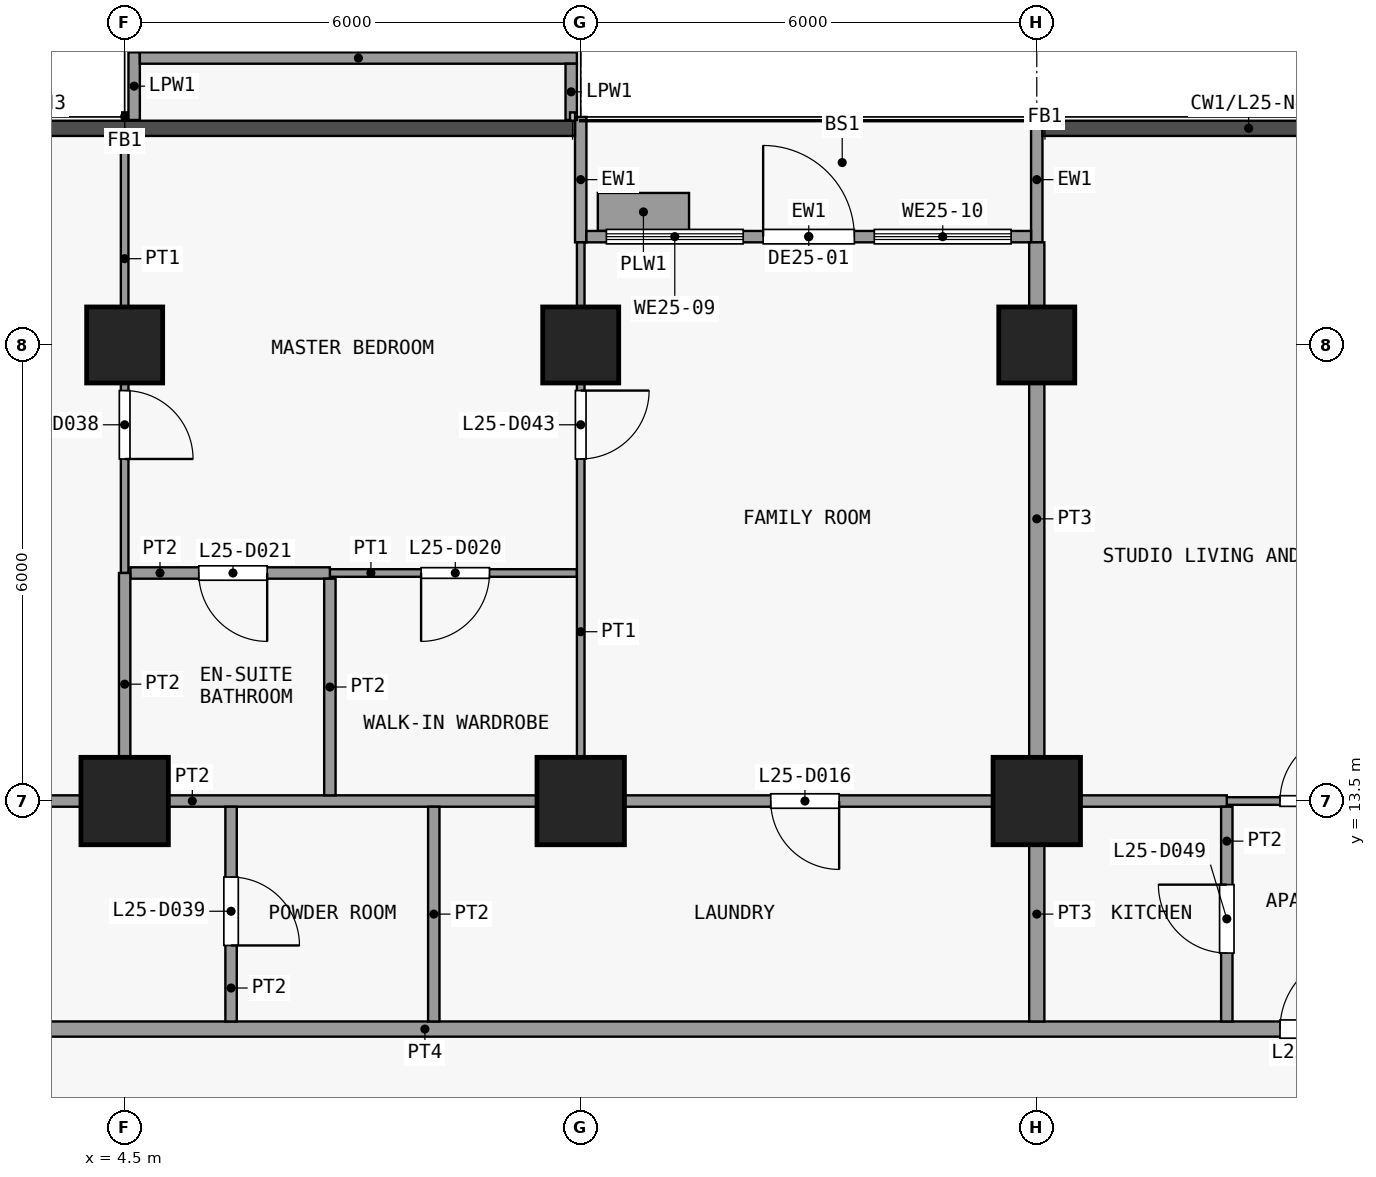
"""IFC4 building model, lengths in metres.
Left out: names, types, materials, properties, quantities, classifications, styles, units other than length and angle.
Written with IfcOpenShell. Run it as: python <this file> out.ifc"""

import sys

from ifc_helpers import new_model, si_unit, direction, frame, frame_2d, origin, origin_2d, place, context, subcontext, project, spatial, rectangle, extrude, element, fill, save


model = new_model("IFC4")
c1 = context("Model", 3, precision=1e-05, world=origin(), true_north=direction((0.0, 1.0)))
c2 = subcontext(c1, "Body", "Model", "MODEL_VIEW")
j1 = project(units=[si_unit("LENGTHUNIT", "METRE"), si_unit("PLANEANGLEUNIT", "RADIAN")], contexts=[c1])
p1 = place(None, origin())
s1 = spatial("IfcSite", under=j1, at=p1, CompositionType="ELEMENT")
p2 = place(p1, origin())
s2 = spatial("IfcBuilding", under=s1, at=p2, CompositionType="ELEMENT")
p3 = place(p2, frame((0.0, 0.0, 102.7)))
s3 = spatial("IfcBuildingStorey", under=s2, at=p3, CompositionType="ELEMENT", Elevation=102.7)
p4 = place(p3, frame((4.5, 13.5, 0.0), z_axis=(0.0, 0.0, 1.0), x_axis=(1.0, 0.0, 0.0)))
e1 = element("IfcColumn", 1, at=p4, inside=s3, PredefinedType="COLUMN", context=c2, shape_type="SweptSolid", body=[
    extrude(rectangle(XDim=1.15, YDim=1.15, at=origin_2d()), origin(), (0.0, 0.0, 1.0), 3.6),
])
p5 = place(p3, frame((4.5, 19.5, 0.0), z_axis=(0.0, 0.0, 1.0), x_axis=(1.0, 0.0, 0.0)))
e2 = element("IfcColumn", 2, at=p5, inside=s3, PredefinedType="COLUMN", context=c2, shape_type="SweptSolid", body=[
    extrude(rectangle(XDim=1.0, YDim=1.0, at=origin_2d()), origin(), (0.0, 0.0, 1.0), 3.6),
])
p6 = place(p3, frame((10.5, 13.5, 0.0), z_axis=(0.0, 0.0, 1.0), x_axis=(1.0, 0.0, 0.0)))
e3 = element("IfcColumn", 3, at=p6, inside=s3, PredefinedType="COLUMN", context=c2, shape_type="SweptSolid", body=[
    extrude(rectangle(XDim=1.15, YDim=1.15, at=origin_2d()), origin(), (0.0, 0.0, 1.0), 3.6),
])
p7 = place(p3, frame((10.5, 19.5, 0.0), z_axis=(0.0, 0.0, 1.0), x_axis=(1.0, 0.0, 0.0)))
e4 = element("IfcColumn", 4, at=p7, inside=s3, PredefinedType="COLUMN", context=c2, shape_type="SweptSolid", body=[
    extrude(rectangle(XDim=1.0, YDim=1.0, at=origin_2d()), origin(), (0.0, 0.0, 1.0), 3.6),
])
p8 = place(p3, frame((16.5, 13.5, 0.0), z_axis=(0.0, 0.0, 1.0), x_axis=(1.0, 0.0, 0.0)))
e5 = element("IfcColumn", 5, at=p8, inside=s3, PredefinedType="COLUMN", context=c2, shape_type="SweptSolid", body=[
    extrude(rectangle(XDim=1.15, YDim=1.15, at=origin_2d()), origin(), (0.0, 0.0, 1.0), 3.6),
])
p9 = place(p3, frame((16.5, 19.5, 0.0), z_axis=(0.0, 0.0, 1.0), x_axis=(1.0, 0.0, 0.0)))
e6 = element("IfcColumn", 6, at=p9, inside=s3, PredefinedType="COLUMN", context=c2, shape_type="SweptSolid", body=[
    extrude(rectangle(XDim=1.0, YDim=1.0, at=origin_2d()), origin(), (0.0, 0.0, 1.0), 3.6),
])
for number, where, z_axis, x_axis in (
    (7, (10.5, 20.85, 0.0), (0.0, 0.0, 1.0), (0.0, 1.0, 0.0)),
    (8, (16.5, 20.85, 0.0), (0.0, 0.0, 1.0), (0.0, 1.0, 0.0)),
):
    element("IfcWall", number, at=place(p3, frame(where, z_axis=z_axis, x_axis=x_axis)), inside=s3, PredefinedType="SOLIDWALL", context=c2, shape_type="SweptSolid", body=[
        extrude(rectangle(XDim=1.65, YDim=0.15, at=frame_2d((0.825, 0.0))), origin(), (0.0, 0.0, 1.0), 3.3),
    ])
p10 = place(p3, frame((10.575, 20.925, 0.0), z_axis=(0.0, 0.0, 1.0), x_axis=(1.0, 0.0, 0.0)))
e9 = element("IfcWall", 9, at=p10, inside=s3, PredefinedType="SOLIDWALL", context=c2, shape_type="SweptSolid", body=[
    extrude(rectangle(XDim=5.85, YDim=0.15, at=frame_2d((2.925, 0.0))), origin(), (0.0, 0.0, 1.0), 3.3),
])
p11 = place(p10, frame((2.325, 0.0, 0.0)))
e10 = element("IfcOpeningElement", 10, at=p11, cuts=e9, PredefinedType="OPENING", context=c2, shape_type="SweptSolid", body=[
    extrude(rectangle(XDim=1.2, YDim=2.4, at=frame_2d((0.6, 1.2))), frame((0.0, 0.085, 0.0), z_axis=(0.0, -1.0, 0.0), x_axis=(1.0, 0.0, 0.0)), (0.0, 0.0, 1.0), 0.17),
])
p12 = place(p10, frame((0.262, 0.0, 0.9)))
e11 = element("IfcOpeningElement", 11, at=p12, cuts=e9, PredefinedType="OPENING", context=c2, shape_type="SweptSolid", body=[
    extrude(rectangle(XDim=1.8, YDim=2.1, at=frame_2d((0.9, 1.05))), frame((0.0, 0.085, 0.0), z_axis=(0.0, -1.0, 0.0), x_axis=(1.0, 0.0, 0.0)), (0.0, 0.0, 1.0), 0.17),
])
p13 = place(p10, frame((3.788, 0.0, 0.9)))
e12 = element("IfcOpeningElement", 12, at=p13, cuts=e9, PredefinedType="OPENING", context=c2, shape_type="SweptSolid", body=[
    extrude(rectangle(XDim=1.8, YDim=2.1, at=frame_2d((0.9, 1.05))), frame((0.0, 0.085, 0.0), z_axis=(0.0, -1.0, 0.0), x_axis=(1.0, 0.0, 0.0)), (0.0, 0.0, 1.0), 0.17),
])
p14 = place(p3, frame((10.725, 21.25, 0.0), z_axis=(0.0, 0.0, 1.0), x_axis=(1.0, 0.0, 0.0)))
e13 = element("IfcWall", 13, at=p14, inside=s3, PredefinedType="USERDEFINED", context=c2, shape_type="SweptSolid", body=[
    extrude(rectangle(XDim=1.2, YDim=0.5, at=frame_2d((0.6, 0.0))), origin(), (0.0, 0.0, 1.0), 0.9),
])
p15 = place(p3, frame((4.625, 22.46, 0.0), z_axis=(0.0, 0.0, 1.0), x_axis=(0.0, 1.0, 0.0)))
e14 = element("IfcWall", 14, at=p15, inside=s3, PredefinedType="PARAPET", context=c2, shape_type="SweptSolid", body=[
    extrude(rectangle(XDim=0.89, YDim=0.15, at=frame_2d((0.445, 0.0))), origin(), (0.0, 0.0, 1.0), 1.15),
])
p16 = place(p3, frame((4.7, 23.275, 0.0), z_axis=(0.0, 0.0, 1.0), x_axis=(1.0, 0.0, 0.0)))
e15 = element("IfcWall", 15, at=p16, inside=s3, PredefinedType="PARAPET", context=c2, shape_type="SweptSolid", body=[
    extrude(rectangle(XDim=5.75, YDim=0.15, at=frame_2d((2.875, 0.0))), origin(), (0.0, 0.0, 1.0), 1.15),
])
p17 = place(p3, frame((10.375, 23.2, 0.0), z_axis=(0.0, 0.0, 1.0), x_axis=(0.0, -1.0, 0.0)))
e16 = element("IfcWall", 16, at=p17, inside=s3, PredefinedType="PARAPET", context=c2, shape_type="SweptSolid", body=[
    extrude(rectangle(XDim=0.74, YDim=0.15, at=frame_2d((0.37, 0.0))), origin(), (0.0, 0.0, 1.0), 1.15),
])
p18 = place(p3, frame((-25.35, 10.5, 0.0), z_axis=(0.0, 0.0, 1.0), x_axis=(1.0, 0.0, 0.0)))
e17 = element("IfcWall", 17, at=p18, inside=s3, PredefinedType="PARTITIONING", context=c2, shape_type="SweptSolid", body=[
    extrude(rectangle(XDim=50.7, YDim=0.2, at=frame_2d((25.35, 0.0))), origin(), (0.0, 0.0, 1.0), 3.3),
])
p19 = place(p18, frame((7.05, 0.0, 0.0)))
e18 = element("IfcOpeningElement", 18, at=p19, cuts=e17, PredefinedType="OPENING", context=c2, shape_type="SweptSolid", body=[
    extrude(rectangle(XDim=1.0, YDim=2.1, at=frame_2d((0.5, 1.05))), frame((0.0, 0.11, 0.0), z_axis=(0.0, -1.0, 0.0), x_axis=(1.0, 0.0, 0.0)), (0.0, 0.0, 1.0), 0.22),
])
p20 = place(p18, frame((21.55, 0.0, 0.0)))
e19 = element("IfcOpeningElement", 19, at=p20, cuts=e17, PredefinedType="OPENING", context=c2, shape_type="SweptSolid", body=[
    extrude(rectangle(XDim=1.0, YDim=2.1, at=frame_2d((0.5, 1.05))), frame((0.0, 0.11, 0.0), z_axis=(0.0, -1.0, 0.0), x_axis=(1.0, 0.0, 0.0)), (0.0, 0.0, 1.0), 0.22),
])
p21 = place(p18, frame((45.05, 0.0, 0.0)))
e20 = element("IfcOpeningElement", 20, at=p21, cuts=e17, PredefinedType="OPENING", context=c2, shape_type="SweptSolid", body=[
    extrude(rectangle(XDim=1.0, YDim=2.1, at=frame_2d((0.5, 1.05))), frame((0.0, 0.11, 0.0), z_axis=(0.0, -1.0, 0.0), x_axis=(1.0, 0.0, 0.0)), (0.0, 0.0, 1.0), 0.22),
])
p22 = place(p3, frame((19.0, 13.5, 0.0), z_axis=(0.0, 0.0, 1.0), x_axis=(1.0, 0.0, 0.0)))
e21 = element("IfcWall", 21, at=p22, inside=s3, PredefinedType="PARTITIONING", context=c2, shape_type="SweptSolid", body=[
    extrude(rectangle(XDim=2.4, YDim=0.1, at=frame_2d((1.2, 0.0))), origin(), (0.0, 0.0, 1.0), 3.3),
])
p23 = place(p22, frame((0.7, 0.0, 0.0)))
e22 = element("IfcOpeningElement", 22, at=p23, cuts=e21, PredefinedType="OPENING", context=c2, shape_type="SweptSolid", body=[
    extrude(rectangle(XDim=0.9, YDim=2.1, at=frame_2d((0.45, 1.05))), frame((0.0, 0.06, 0.0), z_axis=(0.0, -1.0, 0.0), x_axis=(1.0, 0.0, 0.0)), (0.0, 0.0, 1.0), 0.12),
])
p24 = place(p3, frame((-2.1, 13.5, 0.0), z_axis=(0.0, 0.0, 1.0), x_axis=(1.0, 0.0, 0.0)))
e23 = element("IfcWall", 23, at=p24, inside=s3, PredefinedType="PARTITIONING", context=c2, shape_type="SweptSolid", body=[
    extrude(rectangle(XDim=21.1, YDim=0.15, at=frame_2d((10.55, 0.0))), origin(), (0.0, 0.0, 1.0), 3.3),
])
p25 = place(p24, frame((15.1, 0.0, 0.0)))
e24 = element("IfcOpeningElement", 24, at=p25, cuts=e23, PredefinedType="OPENING", context=c2, shape_type="SweptSolid", body=[
    extrude(rectangle(XDim=0.9, YDim=2.1, at=frame_2d((0.45, 1.05))), frame((0.0, 0.085, 0.0), z_axis=(0.0, -1.0, 0.0), x_axis=(1.0, 0.0, 0.0)), (0.0, 0.0, 1.0), 0.17),
])
p26 = place(p3, frame((7.2, 16.5, 0.0), z_axis=(0.0, 0.0, 1.0), x_axis=(1.0, 0.0, 0.0)))
e25 = element("IfcWall", 25, at=p26, inside=s3, PredefinedType="PARTITIONING", context=c2, shape_type="SweptSolid", body=[
    extrude(rectangle(XDim=3.25, YDim=0.1, at=frame_2d((1.625, 0.0))), origin(), (0.0, 0.0, 1.0), 3.3),
])
p27 = place(p26, frame((1.2, 0.0, 0.0)))
e26 = element("IfcOpeningElement", 26, at=p27, cuts=e25, PredefinedType="OPENING", context=c2, shape_type="SweptSolid", body=[
    extrude(rectangle(XDim=0.9, YDim=2.1, at=frame_2d((0.45, 1.05))), frame((0.0, 0.06, 0.0), z_axis=(0.0, -1.0, 0.0), x_axis=(1.0, 0.0, 0.0)), (0.0, 0.0, 1.0), 0.12),
])
p28 = place(p3, frame((4.575, 16.5, 0.0), z_axis=(0.0, 0.0, 1.0), x_axis=(1.0, 0.0, 0.0)))
e27 = element("IfcWall", 27, at=p28, inside=s3, PredefinedType="PARTITIONING", context=c2, shape_type="SweptSolid", body=[
    extrude(rectangle(XDim=2.625, YDim=0.15, at=frame_2d((1.312, 0.0))), origin(), (0.0, 0.0, 1.0), 3.3),
])
p29 = place(p28, frame((0.9, 0.0, 0.0)))
e28 = element("IfcOpeningElement", 28, at=p29, cuts=e27, PredefinedType="OPENING", context=c2, shape_type="SweptSolid", body=[
    extrude(rectangle(XDim=0.9, YDim=2.1, at=frame_2d((0.45, 1.05))), frame((0.0, 0.085, 0.0), z_axis=(0.0, -1.0, 0.0), x_axis=(1.0, 0.0, 0.0)), (0.0, 0.0, 1.0), 0.17),
])
p30 = place(p3, frame((4.5, 16.5, 0.0), z_axis=(0.0, 0.0, 1.0), x_axis=(0.0, 1.0, 0.0)))
e29 = element("IfcWall", 29, at=p30, inside=s3, PredefinedType="PARTITIONING", context=c2, shape_type="SweptSolid", body=[
    extrude(rectangle(XDim=5.75, YDim=0.1, at=frame_2d((2.875, 0.0))), origin(), (0.0, 0.0, 1.0), 3.3),
])
p31 = place(p30, frame((1.5, 0.0, 0.0)))
e30 = element("IfcOpeningElement", 30, at=p31, cuts=e29, PredefinedType="OPENING", context=c2, shape_type="SweptSolid", body=[
    extrude(rectangle(XDim=0.9, YDim=2.1, at=frame_2d((0.45, 1.05))), frame((0.0, 0.06, 0.0), z_axis=(0.0, -1.0, 0.0), x_axis=(1.0, 0.0, 0.0)), (0.0, 0.0, 1.0), 0.12),
])
p32 = place(p3, frame((4.5, 13.575, 0.0), z_axis=(0.0, 0.0, 1.0), x_axis=(0.0, 1.0, 0.0)))
e31 = element("IfcWall", 31, at=p32, inside=s3, PredefinedType="PARTITIONING", context=c2, shape_type="SweptSolid", body=[
    extrude(rectangle(XDim=2.925, YDim=0.15, at=frame_2d((1.462, 0.0))), origin(), (0.0, 0.0, 1.0), 3.3),
])
p33 = place(p3, frame((5.9, 10.6, 0.0), z_axis=(0.0, 0.0, 1.0), x_axis=(0.0, 1.0, 0.0)))
e32 = element("IfcWall", 32, at=p33, inside=s3, PredefinedType="PARTITIONING", context=c2, shape_type="SweptSolid", body=[
    extrude(rectangle(XDim=2.825, YDim=0.15, at=frame_2d((1.413, 0.0))), origin(), (0.0, 0.0, 1.0), 3.3),
])
p34 = place(p33, frame((1.0, 0.0, 0.0)))
e33 = element("IfcOpeningElement", 33, at=p34, cuts=e32, PredefinedType="OPENING", context=c2, shape_type="SweptSolid", body=[
    extrude(rectangle(XDim=0.9, YDim=2.1, at=frame_2d((0.45, 1.05))), frame((0.0, 0.085, 0.0), z_axis=(0.0, -1.0, 0.0), x_axis=(1.0, 0.0, 0.0)), (0.0, 0.0, 1.0), 0.17),
])
p35 = place(p3, frame((7.2, 13.575, 0.0), z_axis=(0.0, 0.0, 1.0), x_axis=(0.0, 1.0, 0.0)))
e34 = element("IfcWall", 34, at=p35, inside=s3, PredefinedType="PARTITIONING", context=c2, shape_type="SweptSolid", body=[
    extrude(rectangle(XDim=2.85, YDim=0.15, at=frame_2d((1.425, 0.0))), origin(), (0.0, 0.0, 1.0), 3.3),
])
p36 = place(p3, frame((8.567, 10.6, 0.0), z_axis=(0.0, 0.0, 1.0), x_axis=(0.0, 1.0, 0.0)))
e35 = element("IfcWall", 35, at=p36, inside=s3, PredefinedType="PARTITIONING", context=c2, shape_type="SweptSolid", body=[
    extrude(rectangle(XDim=2.825, YDim=0.15, at=frame_2d((1.413, 0.0))), origin(), (0.0, 0.0, 1.0), 3.3),
])
p37 = place(p3, frame((10.5, 13.575, 0.0), z_axis=(0.0, 0.0, 1.0), x_axis=(0.0, 1.0, 0.0)))
e36 = element("IfcWall", 36, at=p37, inside=s3, PredefinedType="PARTITIONING", context=c2, shape_type="SweptSolid", body=[
    extrude(rectangle(XDim=7.275, YDim=0.1, at=frame_2d((3.638, 0.0))), origin(), (0.0, 0.0, 1.0), 3.3),
])
p38 = place(p37, frame((4.425, 0.0, 0.0)))
e37 = element("IfcOpeningElement", 37, at=p38, cuts=e36, PredefinedType="OPENING", context=c2, shape_type="SweptSolid", body=[
    extrude(rectangle(XDim=0.9, YDim=2.1, at=frame_2d((0.45, 1.05))), frame((0.0, 0.06, 0.0), z_axis=(0.0, -1.0, 0.0), x_axis=(1.0, 0.0, 0.0)), (0.0, 0.0, 1.0), 0.12),
])
p39 = place(p3, frame((16.5, 10.6, 0.0), z_axis=(0.0, 0.0, 1.0), x_axis=(0.0, 1.0, 0.0)))
e38 = element("IfcWall", 38, at=p39, inside=s3, PredefinedType="PARTITIONING", context=c2, shape_type="SweptSolid", body=[
    extrude(rectangle(XDim=2.825, YDim=0.2, at=frame_2d((1.413, 0.0))), origin(), (0.0, 0.0, 1.0), 3.3),
])
p40 = place(p3, frame((16.5, 13.575, 0.0), z_axis=(0.0, 0.0, 1.0), x_axis=(0.0, 1.0, 0.0)))
e39 = element("IfcWall", 39, at=p40, inside=s3, PredefinedType="PARTITIONING", context=c2, shape_type="SweptSolid", body=[
    extrude(rectangle(XDim=7.275, YDim=0.2, at=frame_2d((3.638, 0.0))), origin(), (0.0, 0.0, 1.0), 3.3),
])
p41 = place(p3, frame((19.0, 10.6, 0.0), z_axis=(0.0, 0.0, 1.0), x_axis=(0.0, 1.0, 0.0)))
e40 = element("IfcWall", 40, at=p41, inside=s3, PredefinedType="PARTITIONING", context=c2, shape_type="SweptSolid", body=[
    extrude(rectangle(XDim=2.825, YDim=0.15, at=frame_2d((1.413, 0.0))), origin(), (0.0, 0.0, 1.0), 3.3),
])
p42 = place(p41, frame((0.9, 0.0, 0.0)))
e41 = element("IfcOpeningElement", 41, at=p42, cuts=e40, PredefinedType="OPENING", context=c2, shape_type="SweptSolid", body=[
    extrude(rectangle(XDim=0.9, YDim=2.1, at=frame_2d((0.45, 1.05))), frame((0.0, 0.085, 0.0), z_axis=(0.0, -1.0, 0.0), x_axis=(1.0, 0.0, 0.0)), (0.0, 0.0, 1.0), 0.17),
])
p43 = place(p11, origin())
e42 = element("IfcDoor", 42, at=p43, inside=s3, OperationType="SINGLE_SWING_LEFT", PredefinedType="DOOR", context=c2, shape_type="SweptSolid", body=[
    extrude(rectangle(XDim=1.2, YDim=2.4, at=frame_2d((0.6, 1.2))), frame((0.0, 0.025, 0.0), z_axis=(0.0, -1.0, 0.0), x_axis=(1.0, 0.0, 0.0)), (0.0, 0.0, 1.0), 0.05),
])
fill(e10, e42)
p44 = place(p12, origin())
e43 = element("IfcWindow", 43, at=p44, inside=s3, PartitioningType="SINGLE_PANEL", PredefinedType="WINDOW", context=c2, shape_type="SweptSolid", body=[
    extrude(rectangle(XDim=1.8, YDim=2.1, at=frame_2d((0.9, 1.05))), frame((0.0, 0.03, 0.0), z_axis=(0.0, -1.0, 0.0), x_axis=(1.0, 0.0, 0.0)), (0.0, 0.0, 1.0), 0.06),
])
fill(e11, e43)
p45 = place(p13, origin())
e44 = element("IfcWindow", 44, at=p45, inside=s3, PartitioningType="SINGLE_PANEL", PredefinedType="WINDOW", context=c2, shape_type="SweptSolid", body=[
    extrude(rectangle(XDim=1.8, YDim=2.1, at=frame_2d((0.9, 1.05))), frame((0.0, 0.03, 0.0), z_axis=(0.0, -1.0, 0.0), x_axis=(1.0, 0.0, 0.0)), (0.0, 0.0, 1.0), 0.06),
])
fill(e12, e44)
p46 = place(p21, origin())
e45 = element("IfcDoor", 45, at=p46, inside=s3, OperationType="SINGLE_SWING_LEFT", PredefinedType="DOOR", context=c2, shape_type="SweptSolid", body=[
    extrude(rectangle(XDim=1.0, YDim=2.1, at=frame_2d((0.5, 1.05))), frame((0.0, 0.025, 0.0), z_axis=(0.0, -1.0, 0.0), x_axis=(1.0, 0.0, 0.0)), (0.0, 0.0, 1.0), 0.05),
])
fill(e20, e45)
p47 = place(p23, origin())
e46 = element("IfcDoor", 46, at=p47, inside=s3, OperationType="SINGLE_SWING_LEFT", PredefinedType="DOOR", context=c2, shape_type="SweptSolid", body=[
    extrude(rectangle(XDim=0.9, YDim=2.1, at=frame_2d((0.45, 1.05))), frame((0.0, 0.025, 0.0), z_axis=(0.0, -1.0, 0.0), x_axis=(1.0, 0.0, 0.0)), (0.0, 0.0, 1.0), 0.05),
])
fill(e22, e46)
p48 = place(p25, origin())
e47 = element("IfcDoor", 47, at=p48, inside=s3, OperationType="SINGLE_SWING_RIGHT", PredefinedType="DOOR", context=c2, shape_type="SweptSolid", body=[
    extrude(rectangle(XDim=0.9, YDim=2.1, at=frame_2d((0.45, 1.05))), frame((0.0, 0.025, 0.0), z_axis=(0.0, -1.0, 0.0), x_axis=(1.0, 0.0, 0.0)), (0.0, 0.0, 1.0), 0.05),
])
fill(e24, e47)
p49 = place(p27, origin())
e48 = element("IfcDoor", 48, at=p49, inside=s3, OperationType="SINGLE_SWING_LEFT", PredefinedType="DOOR", context=c2, shape_type="SweptSolid", body=[
    extrude(rectangle(XDim=0.9, YDim=2.1, at=frame_2d((0.45, 1.05))), frame((0.0, 0.025, 0.0), z_axis=(0.0, -1.0, 0.0), x_axis=(1.0, 0.0, 0.0)), (0.0, 0.0, 1.0), 0.05),
])
fill(e26, e48)
p50 = place(p29, origin())
e49 = element("IfcDoor", 49, at=p50, inside=s3, OperationType="SINGLE_SWING_RIGHT", PredefinedType="DOOR", context=c2, shape_type="SweptSolid", body=[
    extrude(rectangle(XDim=0.9, YDim=2.1, at=frame_2d((0.45, 1.05))), frame((0.0, 0.025, 0.0), z_axis=(0.0, -1.0, 0.0), x_axis=(1.0, 0.0, 0.0)), (0.0, 0.0, 1.0), 0.05),
])
fill(e28, e49)
p51 = place(p31, origin())
e50 = element("IfcDoor", 50, at=p51, inside=s3, OperationType="SINGLE_SWING_LEFT", PredefinedType="DOOR", context=c2, shape_type="SweptSolid", body=[
    extrude(rectangle(XDim=0.9, YDim=2.1, at=frame_2d((0.45, 1.05))), frame((0.0, 0.025, 0.0), z_axis=(0.0, -1.0, 0.0), x_axis=(1.0, 0.0, 0.0)), (0.0, 0.0, 1.0), 0.05),
])
fill(e30, e50)
p52 = place(p34, origin())
e51 = element("IfcDoor", 51, at=p52, inside=s3, OperationType="SINGLE_SWING_LEFT", PredefinedType="DOOR", context=c2, shape_type="SweptSolid", body=[
    extrude(rectangle(XDim=0.9, YDim=2.1, at=frame_2d((0.45, 1.05))), frame((0.0, 0.025, 0.0), z_axis=(0.0, -1.0, 0.0), x_axis=(1.0, 0.0, 0.0)), (0.0, 0.0, 1.0), 0.05),
])
fill(e33, e51)
p53 = place(p38, origin())
e52 = element("IfcDoor", 52, at=p53, inside=s3, OperationType="SINGLE_SWING_RIGHT", PredefinedType="DOOR", context=c2, shape_type="SweptSolid", body=[
    extrude(rectangle(XDim=0.9, YDim=2.1, at=frame_2d((0.45, 1.05))), frame((0.0, 0.025, 0.0), z_axis=(0.0, -1.0, 0.0), x_axis=(1.0, 0.0, 0.0)), (0.0, 0.0, 1.0), 0.05),
])
fill(e37, e52)
p54 = place(p42, origin())
e53 = element("IfcDoor", 53, at=p54, inside=s3, OperationType="SINGLE_SWING_LEFT", PredefinedType="DOOR", context=c2, shape_type="SweptSolid", body=[
    extrude(rectangle(XDim=0.9, YDim=2.1, at=frame_2d((0.45, 1.05))), frame((0.0, 0.025, 0.0), z_axis=(0.0, -1.0, 0.0), x_axis=(1.0, 0.0, 0.0)), (0.0, 0.0, 1.0), 0.05),
])
fill(e41, e53)
save(model, sys.argv[1])
